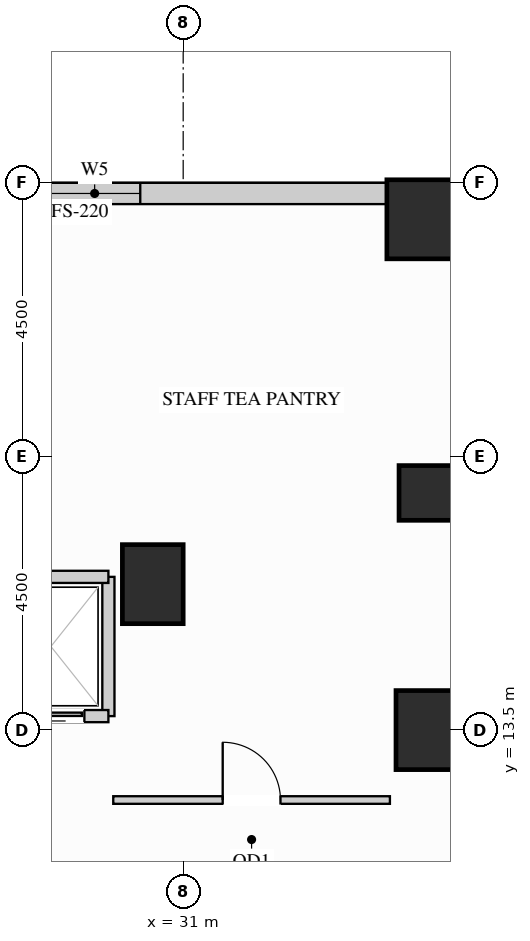
"""IFC4 building model, lengths in metres.
Left out: names, types, materials, properties, quantities, classifications, styles, units other than length and angle.
Written with IfcOpenShell. Run it as: python <this file> out.ifc"""

import sys

from ifc_helpers import new_model, si_unit, direction, frame, frame_2d, origin, origin_2d, place, context, subcontext, project, spatial, rectangle, extrude, source, transform, mapped, element, fill, save


model = new_model("IFC4")
c1 = context("Model", 3, precision=1e-05, world=origin(), true_north=direction((0.0, 1.0)))
c2 = subcontext(c1, "Body", "Model", "MODEL_VIEW")
j1 = project(units=[si_unit("LENGTHUNIT", "METRE"), si_unit("PLANEANGLEUNIT", "RADIAN")], contexts=[c1])
p1 = place(None, origin())
s1 = spatial("IfcSite", under=j1, at=p1, CompositionType="ELEMENT")
p2 = place(p1, origin())
s2 = spatial("IfcBuilding", under=s1, at=p2, CompositionType="ELEMENT")
p3 = place(p2, frame((0.0, 0.0, 65.7)))
s3 = spatial("IfcBuildingStorey", under=s2, at=p3, CompositionType="ELEMENT", Elevation=65.7)
m1 = source(origin(), c2, "Body", "SweptSolid", [
    extrude(rectangle(XDim=0.9, YDim=0.9, at=origin_2d()), origin(), (0.0, 0.0, 1.0), 3.38),
])
p4 = place(p3, frame((35.0, 17.4, 0.0), z_axis=(0.0, 0.0, 1.0), x_axis=(1.0, 0.0, 0.0)))
e1 = element("IfcColumn", 1, at=p4, inside=s3, PredefinedType="COLUMN", context=c2, shape_type="MappedRepresentation", body=[
    mapped(m1, transform((0.0, 0.0, 0.0), x_axis=(1.0, 0.0, 0.0), y_axis=(0.0, 1.0, 0.0), z_axis=(0.0, 0.0, 1.0))),
])
m2 = source(origin(), c2, "Body", "SweptSolid", [
    extrude(rectangle(XDim=1.0, YDim=1.3, at=origin_2d()), origin(), (0.0, 0.0, 1.0), 3.38),
])
for number, where, z_axis, x_axis in (
    (2, (35.0, 13.5, 0.0), (0.0, 0.0, 1.0), (1.0, 0.0, 0.0)),
    (3, (30.5, 15.9, 0.0), (0.0, 0.0, 1.0), (1.0, 0.0, 0.0)),
):
    element("IfcColumn", number, at=place(p3, frame(where, z_axis=z_axis, x_axis=x_axis)), inside=s3, PredefinedType="COLUMN", context=c2, shape_type="MappedRepresentation", body=[
        mapped(m2, transform((0.0, 0.0, 0.0), x_axis=(1.0, 0.0, 0.0), y_axis=(0.0, 1.0, 0.0), z_axis=(0.0, 0.0, 1.0))),
    ])
m3 = source(origin(), c2, "Body", "SweptSolid", [
    extrude(rectangle(XDim=1.3, YDim=1.3, at=origin_2d()), origin(), (0.0, 0.0, 1.0), 3.38),
])
p5 = place(p3, frame((35.0, 21.9, 0.0), z_axis=(0.0, 0.0, 1.0), x_axis=(1.0, 0.0, 0.0)))
e4 = element("IfcColumn", 4, at=p5, inside=s3, PredefinedType="COLUMN", context=c2, shape_type="MappedRepresentation", body=[
    mapped(m3, transform((0.0, 0.0, 0.0), x_axis=(1.0, 0.0, 0.0), y_axis=(0.0, 1.0, 0.0), z_axis=(0.0, 0.0, 1.0))),
])
p6 = place(p3, frame((34.352, 22.325, 0.0), z_axis=(0.0, 0.0, 1.0), x_axis=(-1.0, 0.0, 0.0)))
e5 = element("IfcWall", 5, at=p6, inside=s3, PredefinedType="SOLIDWALL", context=c2, shape_type="SweptSolid", body=[
    extrude(rectangle(XDim=14.854, YDim=0.35, at=frame_2d((7.427, 0.0))), origin(), (0.0, 0.0, 1.0), 3.365),
])
p7 = place(p6, frame((4.058, 0.0, 0.78)))
e6 = element("IfcOpeningElement", 6, at=p7, cuts=e5, PredefinedType="OPENING", context=c2, shape_type="SweptSolid", body=[
    extrude(rectangle(XDim=1.5, YDim=2.0, at=frame_2d((0.75, 1.0))), frame((0.0, 0.185, 0.0), z_axis=(0.0, -1.0, 0.0), x_axis=(1.0, 0.0, 0.0)), (0.0, 0.0, 1.0), 0.37),
])
p8 = place(p6, frame((9.296, 0.0, 0.78)))
e7 = element("IfcOpeningElement", 7, at=p8, cuts=e5, PredefinedType="OPENING", context=c2, shape_type="SweptSolid", body=[
    extrude(rectangle(XDim=1.5, YDim=2.0, at=frame_2d((0.75, 1.0))), frame((0.0, 0.185, 0.0), z_axis=(0.0, -1.0, 0.0), x_axis=(1.0, 0.0, 0.0)), (0.0, 0.0, 1.0), 0.37),
])
p9 = place(p3, frame((29.85, 12.35, 0.0), z_axis=(0.0, 0.0, 1.0), x_axis=(1.0, 0.0, 0.0)))
e8 = element("IfcWall", 8, at=p9, inside=s3, PredefinedType="PARTITIONING", context=c2, shape_type="SweptSolid", body=[
    extrude(rectangle(XDim=4.55, YDim=0.125, at=frame_2d((2.275, 0.0))), origin(), (0.0, 0.0, 1.0), 3.365),
])
p10 = place(p9, frame((1.8, 0.0, 0.0)))
e9 = element("IfcOpeningElement", 9, at=p10, cuts=e8, PredefinedType="OPENING", context=c2, shape_type="SweptSolid", body=[
    extrude(rectangle(XDim=0.95, YDim=2.15, at=frame_2d((0.475, 1.075))), frame((0.0, 0.073, 0.0), z_axis=(0.0, -1.0, 0.0), x_axis=(1.0, 0.0, 0.0)), (0.0, 0.0, 1.0), 0.145),
])
m4 = source(origin(), c2, "Body", "SweptSolid", [
    extrude(rectangle(XDim=2.29, YDim=0.2, at=frame_2d((1.145, 0.0))), origin(), (0.0, 0.0, 1.0), 3.365),
])
p11 = place(p3, frame((29.77, 13.73, 0.0), z_axis=(0.0, 0.0, 1.0), x_axis=(0.0, 1.0, 0.0)))
e10 = element("IfcWall", 10, at=p11, inside=s3, PredefinedType="PARTITIONING", context=c2, shape_type="MappedRepresentation", body=[
    mapped(m4, transform((0.0, 0.0, 0.0), x_axis=(1.0, 0.0, 0.0), y_axis=(0.0, 1.0, 0.0), z_axis=(0.0, 0.0, 1.0))),
])
m5 = source(origin(), c2, "Body", "SweptSolid", [
    extrude(rectangle(XDim=1.89, YDim=0.2, at=frame_2d((0.945, 0.0))), origin(), (0.0, 0.0, 1.0), 2.67),
])
p12 = place(p3, frame((27.88, 16.02, 0.0), z_axis=(0.0, 0.0, 1.0), x_axis=(1.0, 0.0, 0.0)))
e11 = element("IfcWall", 11, at=p12, inside=s3, PredefinedType="PARTITIONING", context=c2, shape_type="MappedRepresentation", body=[
    mapped(m5, transform((0.0, 0.0, 0.0), x_axis=(1.0, 0.0, 0.0), y_axis=(0.0, 1.0, 0.0), z_axis=(0.0, 0.0, 1.0))),
])
p13 = place(p3, frame((27.88, 13.73, 0.0), z_axis=(0.0, 0.0, 1.0), x_axis=(1.0, 0.0, 0.0)))
e12 = element("IfcWall", 12, at=p13, inside=s3, PredefinedType="PARTITIONING", context=c2, shape_type="SweptSolid", body=[
    extrude(rectangle(XDim=1.89, YDim=0.2, at=frame_2d((0.945, 0.0))), origin(), (0.0, 0.0, 1.0), 2.446),
])
p14 = place(p13, frame((0.395, 0.0, 0.0)))
e13 = element("IfcOpeningElement", 13, at=p14, cuts=e12, PredefinedType="OPENING", context=c2, shape_type="SweptSolid", body=[
    extrude(rectangle(XDim=1.1, YDim=2.2, at=frame_2d((0.55, 1.1))), frame((0.0, 0.11, 0.0), z_axis=(0.0, -1.0, 0.0), x_axis=(1.0, 0.0, 0.0)), (0.0, 0.0, 1.0), 0.22),
])
m6 = source(origin(), c2, "Body", "SweptSolid", [
    extrude(rectangle(XDim=1.1, YDim=2.2, at=frame_2d((0.55, 1.1))), frame((0.0, 0.025, 0.0), z_axis=(0.0, -1.0, 0.0), x_axis=(1.0, 0.0, 0.0)), (0.0, 0.0, 1.0), 0.05),
])
p15 = place(p14, origin())
e14 = element("IfcDoor", 14, at=p15, inside=s3, OperationType="SLIDING_TO_LEFT", PredefinedType="DOOR", context=c2, shape_type="MappedRepresentation", body=[
    mapped(m6, transform((0.0, 0.0, 0.0), x_axis=(1.0, 0.0, 0.0), y_axis=(0.0, 1.0, 0.0), z_axis=(0.0, 0.0, 1.0))),
])
fill(e13, e14)
m7 = source(origin(), c2, "Body", "SweptSolid", [
    extrude(rectangle(XDim=0.95, YDim=2.15, at=frame_2d((0.475, 1.075))), frame((0.0, 0.025, 0.0), z_axis=(0.0, -1.0, 0.0), x_axis=(1.0, 0.0, 0.0)), (0.0, 0.0, 1.0), 0.05),
])
p16 = place(p10, origin())
e15 = element("IfcDoor", 15, at=p16, inside=s3, OperationType="SINGLE_SWING_LEFT", PredefinedType="DOOR", context=c2, shape_type="MappedRepresentation", body=[
    mapped(m7, transform((0.0, 0.0, 0.0), x_axis=(1.0, 0.0, 0.0), y_axis=(0.0, 1.0, 0.0), z_axis=(0.0, 0.0, 1.0))),
])
fill(e9, e15)
m8 = source(origin(), c2, "Body", "SweptSolid", [
    extrude(rectangle(XDim=1.5, YDim=2.0, at=frame_2d((0.75, 1.0))), frame((0.0, 0.03, 0.0), z_axis=(0.0, -1.0, 0.0), x_axis=(1.0, 0.0, 0.0)), (0.0, 0.0, 1.0), 0.06),
])
p17 = place(p7, origin())
e16 = element("IfcWindow", 16, at=p17, inside=s3, PartitioningType="SINGLE_PANEL", PredefinedType="WINDOW", context=c2, shape_type="MappedRepresentation", body=[
    mapped(m8, transform((0.0, 0.0, 0.0), x_axis=(1.0, 0.0, 0.0), y_axis=(0.0, 1.0, 0.0), z_axis=(0.0, 0.0, 1.0))),
])
fill(e6, e16)
save(model, sys.argv[1])
